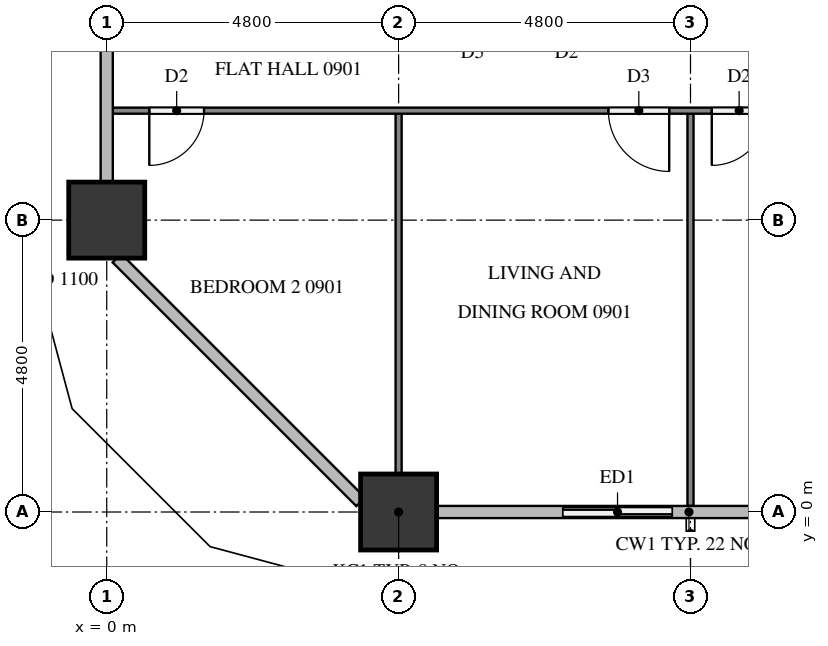
"""IFC4 building model, lengths in metres.
Left out: names, types, materials, properties, quantities, classifications, styles, units other than length and angle.
Written with IfcOpenShell. Run it as: python <this file> out.ifc"""

import sys

from ifc_helpers import new_model, si_unit, direction, frame, frame_2d, origin, origin_2d, place, context, subcontext, project, spatial, rectangle, extrude, element, fill, save


model = new_model("IFC4")
c1 = context("Model", 3, precision=1e-05, world=origin(), true_north=direction((0.0, 1.0)))
c2 = subcontext(c1, "Body", "Model", "MODEL_VIEW")
j1 = project(units=[si_unit("LENGTHUNIT", "METRE"), si_unit("PLANEANGLEUNIT", "RADIAN")], contexts=[c1])
p1 = place(None, origin())
s1 = spatial("IfcSite", under=j1, at=p1, CompositionType="ELEMENT")
p2 = place(p1, origin())
s2 = spatial("IfcBuilding", under=s1, at=p2, CompositionType="ELEMENT")
p3 = place(p2, frame((0.0, 0.0, 39.9)))
s3 = spatial("IfcBuildingStorey", under=s2, at=p3, CompositionType="ELEMENT", Elevation=39.9)
for number, where, z_axis, x_axis in (
    (1, (4.8, 0.0, 0.0), (0.0, 0.0, 1.0), (1.0, 0.0, 0.0)),
    (2, (0.0, 4.8, 0.0), (0.0, 0.0, 1.0), (1.0, 0.0, 0.0)),
):
    element("IfcColumn", number, at=place(p3, frame(where, z_axis=z_axis, x_axis=x_axis)), inside=s3, PredefinedType="COLUMN", context=c2, shape_type="SweptSolid", body=[
        extrude(rectangle(XDim=1.25, YDim=1.25, at=origin_2d()), origin(), (0.0, 0.0, 1.0), 3.2),
    ])
p4 = place(p3, frame((7.2, 0.0, 0.0), z_axis=(0.0, 0.0, 1.0), x_axis=(1.0, 0.0, 0.0)))
e3 = element("IfcWall", 3, at=p4, inside=s3, PredefinedType="SOLIDWALL", context=c2, shape_type="SweptSolid", body=[
    extrude(rectangle(XDim=2.4, YDim=0.15, at=frame_2d((1.2, 0.0))), origin(), (0.0, 0.0, 1.0), 3.2),
])
p5 = place(p4, frame((0.3, 0.0, 0.0)))
e4 = element("IfcOpeningElement", 4, at=p5, cuts=e3, PredefinedType="OPENING", context=c2, shape_type="SweptSolid", body=[
    extrude(rectangle(XDim=1.8, YDim=2.4, at=frame_2d((0.9, 1.2))), frame((0.0, 0.085, 0.0), z_axis=(0.0, -1.0, 0.0), x_axis=(1.0, 0.0, 0.0)), (0.0, 0.0, 1.0), 0.17),
])
p6 = place(p3, frame((9.6, 6.55, 0.0), z_axis=(0.0, 0.0, 1.0), x_axis=(0.0, -1.0, 0.0)))
e5 = element("IfcWall", 5, at=p6, inside=s3, PredefinedType="PARTITIONING", context=c2, shape_type="SweptSolid", body=[
    extrude(rectangle(XDim=6.45, YDim=0.1, at=frame_2d((3.225, 0.0))), origin(), (0.0, 0.0, 1.0), 3.2),
])
p7 = place(p3, frame((4.8, 6.55, 0.0), z_axis=(0.0, 0.0, 1.0), x_axis=(0.0, -1.0, 0.0)))
e6 = element("IfcWall", 6, at=p7, inside=s3, PredefinedType="PARTITIONING", context=c2, shape_type="SweptSolid", body=[
    extrude(rectangle(XDim=5.925, YDim=0.1, at=frame_2d((2.962, 0.0))), origin(), (0.0, 0.0, 1.0), 3.2),
])
p8 = place(p3, frame((14.3, 6.6, 0.0), z_axis=(0.0, 0.0, 1.0), x_axis=(-1.0, 0.0, 0.0)))
e7 = element("IfcWall", 7, at=p8, inside=s3, PredefinedType="PARTITIONING", context=c2, shape_type="SweptSolid", body=[
    extrude(rectangle(XDim=14.2, YDim=0.1, at=frame_2d((7.1, 0.0))), origin(), (0.0, 0.0, 1.0), 3.2),
])
p9 = place(p8, frame((3.45, 0.0, 0.0)))
e8 = element("IfcOpeningElement", 8, at=p9, cuts=e7, PredefinedType="OPENING", context=c2, shape_type="SweptSolid", body=[
    extrude(rectangle(XDim=0.9, YDim=2.1, at=frame_2d((0.45, 1.05))), frame((0.0, 0.06, 0.0), z_axis=(0.0, -1.0, 0.0), x_axis=(1.0, 0.0, 0.0)), (0.0, 0.0, 1.0), 0.12),
])
p10 = place(p8, frame((5.05, 0.0, 0.0)))
e9 = element("IfcOpeningElement", 9, at=p10, cuts=e7, PredefinedType="OPENING", context=c2, shape_type="SweptSolid", body=[
    extrude(rectangle(XDim=1.0, YDim=2.1, at=frame_2d((0.5, 1.05))), frame((0.0, 0.06, 0.0), z_axis=(0.0, -1.0, 0.0), x_axis=(1.0, 0.0, 0.0)), (0.0, 0.0, 1.0), 0.12),
])
p11 = place(p8, frame((12.7, 0.0, 0.0)))
e10 = element("IfcOpeningElement", 10, at=p11, cuts=e7, PredefinedType="OPENING", context=c2, shape_type="SweptSolid", body=[
    extrude(rectangle(XDim=0.9, YDim=2.1, at=frame_2d((0.45, 1.05))), frame((0.0, 0.06, 0.0), z_axis=(0.0, -1.0, 0.0), x_axis=(1.0, 0.0, 0.0)), (0.0, 0.0, 1.0), 0.12),
])
p12 = place(p5, origin())
e11 = element("IfcDoor", 11, at=p12, inside=s3, OperationType="SLIDING_TO_LEFT", PredefinedType="DOOR", context=c2, shape_type="SweptSolid", body=[
    extrude(rectangle(XDim=1.8, YDim=2.4, at=frame_2d((0.9, 1.2))), frame((0.0, 0.025, 0.0), z_axis=(0.0, -1.0, 0.0), x_axis=(1.0, 0.0, 0.0)), (0.0, 0.0, 1.0), 0.05),
])
fill(e4, e11)
p13 = place(p9, origin())
e12 = element("IfcDoor", 12, at=p13, inside=s3, OperationType="SINGLE_SWING_RIGHT", PredefinedType="DOOR", context=c2, shape_type="SweptSolid", body=[
    extrude(rectangle(XDim=0.9, YDim=2.1, at=frame_2d((0.45, 1.05))), frame((0.0, 0.025, 0.0), z_axis=(0.0, -1.0, 0.0), x_axis=(1.0, 0.0, 0.0)), (0.0, 0.0, 1.0), 0.05),
])
fill(e8, e12)
p14 = place(p10, origin())
e13 = element("IfcDoor", 13, at=p14, inside=s3, OperationType="SINGLE_SWING_LEFT", PredefinedType="DOOR", context=c2, shape_type="SweptSolid", body=[
    extrude(rectangle(XDim=1.0, YDim=2.1, at=frame_2d((0.5, 1.05))), frame((0.0, 0.025, 0.0), z_axis=(0.0, -1.0, 0.0), x_axis=(1.0, 0.0, 0.0)), (0.0, 0.0, 1.0), 0.05),
])
fill(e9, e13)
p15 = place(p11, origin())
e14 = element("IfcDoor", 14, at=p15, inside=s3, OperationType="SINGLE_SWING_RIGHT", PredefinedType="DOOR", context=c2, shape_type="SweptSolid", body=[
    extrude(rectangle(XDim=0.9, YDim=2.1, at=frame_2d((0.45, 1.05))), frame((0.0, 0.025, 0.0), z_axis=(0.0, -1.0, 0.0), x_axis=(1.0, 0.0, 0.0)), (0.0, 0.0, 1.0), 0.05),
])
fill(e10, e14)
save(model, sys.argv[1])
